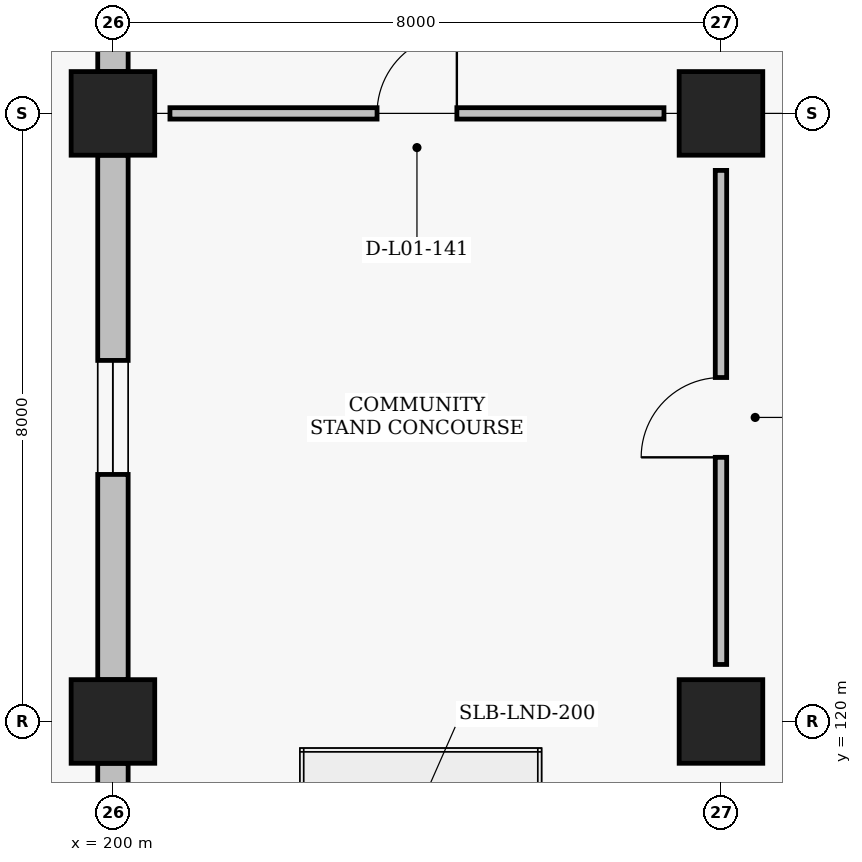
"""IFC4 building model, lengths in metres.
Left out: names, types, materials, properties, quantities, classifications, styles, units other than length and angle.
Written with IfcOpenShell. Run it as: python <this file> out.ifc"""

import sys

from ifc_helpers import new_model, si_unit, direction, frame, frame_2d, origin, origin_2d, place, context, subcontext, project, spatial, rectangle, extrude, element, fill, save


model = new_model("IFC4")
c1 = context("Model", 3, precision=1e-05, world=origin(), true_north=direction((0.0, 1.0)))
c2 = subcontext(c1, "Body", "Model", "MODEL_VIEW")
j1 = project(units=[si_unit("LENGTHUNIT", "METRE"), si_unit("PLANEANGLEUNIT", "RADIAN")], contexts=[c1])
p1 = place(None, origin())
s1 = spatial("IfcSite", under=j1, at=p1, CompositionType="ELEMENT")
p2 = place(p1, origin())
s2 = spatial("IfcBuilding", under=s1, at=p2, CompositionType="ELEMENT")
p3 = place(p2, origin())
s3 = spatial("IfcBuildingStorey", under=s2, at=p3, CompositionType="ELEMENT", Elevation=0.0)
for number, where, z_axis, x_axis in (
    (1, (200.0, 120.0, 0.0), (0.0, 0.0, 1.0), (1.0, 0.0, 0.0)),
    (2, (200.0, 128.0, 0.0), (0.0, 0.0, 1.0), (1.0, 0.0, 0.0)),
    (3, (208.0, 120.0, 0.0), (0.0, 0.0, 1.0), (1.0, 0.0, 0.0)),
    (4, (208.0, 128.0, 0.0), (0.0, 0.0, 1.0), (1.0, 0.0, 0.0)),
):
    element("IfcColumn", number, at=place(p3, frame(where, z_axis=z_axis, x_axis=x_axis)), inside=s3, PredefinedType="COLUMN", context=c2, shape_type="SweptSolid", body=[
        extrude(rectangle(XDim=1.1, YDim=1.1, at=origin_2d()), origin(), (0.0, 0.0, 1.0), 4.8),
    ])
p4 = place(p3, frame((200.0, 112.55, 0.0), z_axis=(0.0, 0.0, 1.0), x_axis=(0.0, 1.0, 0.0)))
e5 = element("IfcWall", 5, at=p4, inside=s3, PredefinedType="SOLIDWALL", context=c2, shape_type="SweptSolid", body=[
    extrude(rectangle(XDim=6.9, YDim=0.4, at=frame_2d((3.45, 0.0))), origin(), (0.0, 0.0, 1.0), 3.66),
])
p5 = place(p3, frame((200.0, 120.55, 0.0), z_axis=(0.0, 0.0, 1.0), x_axis=(0.0, 1.0, 0.0)))
e6 = element("IfcWall", 6, at=p5, inside=s3, PredefinedType="SOLIDWALL", context=c2, shape_type="SweptSolid", body=[
    extrude(rectangle(XDim=6.9, YDim=0.4, at=frame_2d((3.45, 0.0))), origin(), (0.0, 0.0, 1.0), 3.66),
])
p6 = place(p5, frame((2.7, 0.0, 0.95)))
e7 = element("IfcOpeningElement", 7, at=p6, cuts=e6, PredefinedType="OPENING", context=c2, shape_type="SweptSolid", body=[
    extrude(rectangle(XDim=1.5, YDim=1.6, at=frame_2d((0.75, 0.8))), frame((0.0, 0.21, 0.0), z_axis=(0.0, -1.0, 0.0), x_axis=(1.0, 0.0, 0.0)), (0.0, 0.0, 1.0), 0.42),
])
p7 = place(p3, frame((200.0, 128.55, 0.0), z_axis=(0.0, 0.0, 1.0), x_axis=(0.0, 1.0, 0.0)))
e8 = element("IfcWall", 8, at=p7, inside=s3, PredefinedType="SOLIDWALL", context=c2, shape_type="SweptSolid", body=[
    extrude(rectangle(XDim=7.0, YDim=0.4, at=frame_2d((3.5, 0.0))), origin(), (0.0, 0.0, 1.0), 3.81),
])
p8 = place(p3, frame((200.75, 128.0, 0.0), z_axis=(0.0, 0.0, 1.0), x_axis=(1.0, 0.0, 0.0)))
e9 = element("IfcWall", 9, at=p8, inside=s3, PredefinedType="PARTITIONING", context=c2, shape_type="SweptSolid", body=[
    extrude(rectangle(XDim=6.5, YDim=0.15, at=frame_2d((3.25, 0.0))), origin(), (0.0, 0.0, 1.0), 3.91),
])
p9 = place(p8, frame((2.725, 0.0, 0.0)))
e10 = element("IfcOpeningElement", 10, at=p9, cuts=e9, PredefinedType="OPENING", context=c2, shape_type="SweptSolid", body=[
    extrude(rectangle(XDim=1.05, YDim=2.15, at=frame_2d((0.525, 1.075))), frame((0.0, 0.085, 0.0), z_axis=(0.0, -1.0, 0.0), x_axis=(1.0, 0.0, 0.0)), (0.0, 0.0, 1.0), 0.17),
])
p10 = place(p3, frame((208.0, 120.75, 0.0), z_axis=(0.0, 0.0, 1.0), x_axis=(0.0, 1.0, 0.0)))
e11 = element("IfcWall", 11, at=p10, inside=s3, PredefinedType="PARTITIONING", context=c2, shape_type="SweptSolid", body=[
    extrude(rectangle(XDim=6.5, YDim=0.15, at=frame_2d((3.25, 0.0))), origin(), (0.0, 0.0, 1.0), 3.81),
])
p11 = place(p10, frame((2.725, 0.0, 0.0)))
e12 = element("IfcOpeningElement", 12, at=p11, cuts=e11, PredefinedType="OPENING", context=c2, shape_type="SweptSolid", body=[
    extrude(rectangle(XDim=1.05, YDim=2.15, at=frame_2d((0.525, 1.075))), frame((0.0, 0.085, 0.0), z_axis=(0.0, -1.0, 0.0), x_axis=(1.0, 0.0, 0.0)), (0.0, 0.0, 1.0), 0.17),
])
p12 = place(p6, origin())
e13 = element("IfcWindow", 13, at=p12, inside=s3, PartitioningType="SINGLE_PANEL", PredefinedType="WINDOW", context=c2, shape_type="SweptSolid", body=[
    extrude(rectangle(XDim=1.5, YDim=1.6, at=frame_2d((0.75, 0.8))), frame((0.0, 0.03, 0.0), z_axis=(0.0, -1.0, 0.0), x_axis=(1.0, 0.0, 0.0)), (0.0, 0.0, 1.0), 0.06),
])
fill(e7, e13)
p13 = place(p9, origin())
e14 = element("IfcDoor", 14, at=p13, inside=s3, OperationType="SINGLE_SWING_RIGHT", PredefinedType="DOOR", context=c2, shape_type="SweptSolid", body=[
    extrude(rectangle(XDim=1.05, YDim=2.15, at=frame_2d((0.525, 1.075))), frame((0.0, 0.025, 0.0), z_axis=(0.0, -1.0, 0.0), x_axis=(1.0, 0.0, 0.0)), (0.0, 0.0, 1.0), 0.05),
])
fill(e10, e14)
p14 = place(p11, origin())
e15 = element("IfcDoor", 15, at=p14, inside=s3, OperationType="SINGLE_SWING_LEFT", PredefinedType="DOOR", context=c2, shape_type="SweptSolid", body=[
    extrude(rectangle(XDim=1.05, YDim=2.15, at=frame_2d((0.525, 1.075))), frame((0.0, 0.025, 0.0), z_axis=(0.0, -1.0, 0.0), x_axis=(1.0, 0.0, 0.0)), (0.0, 0.0, 1.0), 0.05),
])
fill(e12, e15)
save(model, sys.argv[1])
